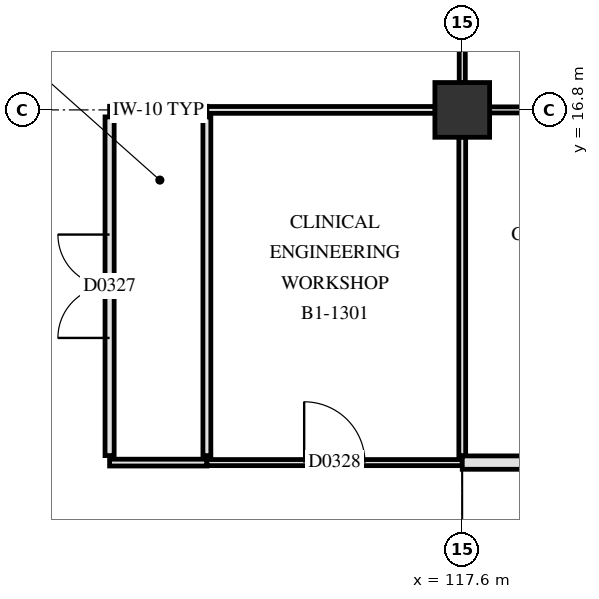
"""IFC4 building model, lengths in metres.
Left out: names, types, materials, properties, quantities, classifications, styles, units other than length and angle.
Written with IfcOpenShell. Run it as: python <this file> out.ifc"""

import sys

from ifc_helpers import new_model, si_unit, direction, frame, frame_2d, origin, origin_2d, place, context, subcontext, project, spatial, rectangle, extrude, element, fill, save


model = new_model("IFC4")
c1 = context("Model", 3, precision=1e-05, world=origin(), true_north=direction((0.0, 1.0)))
c2 = subcontext(c1, "Body", "Model", "MODEL_VIEW")
j1 = project(units=[si_unit("LENGTHUNIT", "METRE"), si_unit("PLANEANGLEUNIT", "RADIAN")], contexts=[c1])
p1 = place(None, origin())
s1 = spatial("IfcSite", under=j1, at=p1, CompositionType="ELEMENT")
p2 = place(p1, origin())
s2 = spatial("IfcBuilding", under=s1, at=p2, CompositionType="ELEMENT")
p3 = place(p2, frame((0.0, 0.0, -5.4)))
s3 = spatial("IfcBuildingStorey", under=s2, at=p3, CompositionType="ELEMENT", Elevation=-5.4)
p4 = place(p3, frame((117.6, 16.8, 0.0), z_axis=(0.0, 0.0, 1.0), x_axis=(1.0, 0.0, 0.0)))
e1 = element("IfcColumn", 1, at=p4, inside=s3, PredefinedType="COLUMN", context=c2, shape_type="SweptSolid", body=[
    extrude(rectangle(XDim=0.9, YDim=0.9, at=origin_2d()), origin(), (0.0, 0.0, 1.0), 5.4),
])
p5 = place(p3, frame((111.8, 11.0, 0.0), z_axis=(0.0, 0.0, 1.0), x_axis=(1.0, 0.0, 0.0)))
e2 = element("IfcWall", 2, at=p5, inside=s3, PredefinedType="PARTITIONING", context=c2, shape_type="SweptSolid", body=[
    extrude(rectangle(XDim=1.6, YDim=0.112, at=frame_2d((0.8, 0.0))), origin(), (0.0, 0.0, 1.0), 5.07),
])
p6 = place(p3, frame((113.4, 11.0, 0.0), z_axis=(0.0, 0.0, 1.0), x_axis=(1.0, 0.0, 0.0)))
e3 = element("IfcWall", 3, at=p6, inside=s3, PredefinedType="PARTITIONING", context=c2, shape_type="SweptSolid", body=[
    extrude(rectangle(XDim=4.2, YDim=0.1, at=frame_2d((2.1, 0.0))), origin(), (0.0, 0.0, 1.0), 4.47),
])
p7 = place(p6, frame((1.6, 0.0, 0.0)))
e4 = element("IfcOpeningElement", 4, at=p7, cuts=e3, PredefinedType="OPENING", context=c2, shape_type="SweptSolid", body=[
    extrude(rectangle(XDim=1.0, YDim=2.15, at=frame_2d((0.5, 1.075))), frame((0.0, 0.06, 0.0), z_axis=(0.0, -1.0, 0.0), x_axis=(1.0, 0.0, 0.0)), (0.0, 0.0, 1.0), 0.12),
])
p8 = place(p3, frame((117.6, 11.0, 0.0), z_axis=(0.0, 0.0, 1.0), x_axis=(1.0, 0.0, 0.0)))
e5 = element("IfcWall", 5, at=p8, inside=s3, PredefinedType="PARTITIONING", context=c2, shape_type="SweptSolid", body=[
    extrude(rectangle(XDim=4.2, YDim=0.22, at=frame_2d((2.1, 0.0))), origin(), (0.0, 0.0, 1.0), 4.47),
])
p9 = place(p8, frame((1.55, 0.0, 0.0)))
e6 = element("IfcOpeningElement", 6, at=p9, cuts=e5, PredefinedType="OPENING", context=c2, shape_type="SweptSolid", body=[
    extrude(rectangle(XDim=1.1, YDim=2.15, at=frame_2d((0.55, 1.075))), frame((0.0, 0.12, 0.0), z_axis=(0.0, -1.0, 0.0), x_axis=(1.0, 0.0, 0.0)), (0.0, 0.0, 1.0), 0.24),
])
p10 = place(p3, frame((111.8, 16.8, 0.0), z_axis=(0.0, 0.0, 1.0), x_axis=(1.0, 0.0, 0.0)))
e7 = element("IfcWall", 7, at=p10, inside=s3, PredefinedType="PARTITIONING", context=c2, shape_type="SweptSolid", body=[
    extrude(rectangle(XDim=1.6, YDim=0.12, at=frame_2d((0.8, 0.0))), origin(), (0.0, 0.0, 1.0), 4.42),
])
p11 = place(p3, frame((113.4, 16.8, 0.0), z_axis=(0.0, 0.0, 1.0), x_axis=(1.0, 0.0, 0.0)))
e8 = element("IfcWall", 8, at=p11, inside=s3, PredefinedType="PARTITIONING", context=c2, shape_type="SweptSolid", body=[
    extrude(rectangle(XDim=3.755, YDim=0.112, at=frame_2d((1.877, 0.0))), origin(), (0.0, 0.0, 1.0), 4.42),
])
p12 = place(p3, frame((118.045, 16.8, 0.0), z_axis=(0.0, 0.0, 1.0), x_axis=(1.0, 0.0, 0.0)))
e9 = element("IfcWall", 9, at=p12, inside=s3, PredefinedType="PARTITIONING", context=c2, shape_type="SweptSolid", body=[
    extrude(rectangle(XDim=3.755, YDim=0.1, at=frame_2d((1.877, 0.0))), origin(), (0.0, 0.0, 1.0), 4.42),
])
p13 = place(p3, frame((111.8, 11.115, 0.0), z_axis=(0.0, 0.0, 1.0), x_axis=(0.0, 1.0, 0.0)))
e10 = element("IfcWall", 10, at=p13, inside=s3, PredefinedType="PARTITIONING", context=c2, shape_type="SweptSolid", body=[
    extrude(rectangle(XDim=5.57, YDim=0.15, at=frame_2d((2.785, 0.0))), origin(), (0.0, 0.0, 1.0), 4.42),
])
p14 = place(p13, frame((1.935, 0.0, 0.0)))
e11 = element("IfcOpeningElement", 11, at=p14, cuts=e10, PredefinedType="OPENING", context=c2, shape_type="SweptSolid", body=[
    extrude(rectangle(XDim=1.7, YDim=2.25, at=frame_2d((0.85, 1.125))), frame((0.0, 0.085, 0.0), z_axis=(0.0, -1.0, 0.0), x_axis=(1.0, 0.0, 0.0)), (0.0, 0.0, 1.0), 0.17),
])
p15 = place(p3, frame((113.4, 11.115, 0.0), z_axis=(0.0, 0.0, 1.0), x_axis=(0.0, 1.0, 0.0)))
e12 = element("IfcWall", 12, at=p15, inside=s3, PredefinedType="PARTITIONING", context=c2, shape_type="SweptSolid", body=[
    extrude(rectangle(XDim=5.57, YDim=0.13, at=frame_2d((2.785, 0.0))), origin(), (0.0, 0.0, 1.0), 4.42),
])
p16 = place(p3, frame((117.6, 11.115, 0.0), z_axis=(0.0, 0.0, 1.0), x_axis=(0.0, 1.0, 0.0)))
e13 = element("IfcWall", 13, at=p16, inside=s3, PredefinedType="PARTITIONING", context=c2, shape_type="SweptSolid", body=[
    extrude(rectangle(XDim=5.24, YDim=0.112, at=frame_2d((2.62, 0.0))), origin(), (0.0, 0.0, 1.0), 4.47),
])
p17 = place(p3, frame((117.6, 17.245, 0.0), z_axis=(0.0, 0.0, 1.0), x_axis=(0.0, 1.0, 0.0)))
e14 = element("IfcWall", 14, at=p17, inside=s3, PredefinedType="PARTITIONING", context=c2, shape_type="SweptSolid", body=[
    extrude(rectangle(XDim=5.24, YDim=0.1, at=frame_2d((2.62, 0.0))), origin(), (0.0, 0.0, 1.0), 4.47),
])
p18 = place(p14, origin())
e15 = element("IfcDoor", 15, at=p18, inside=s3, OperationType="DOUBLE_SWING_RIGHT", PredefinedType="DOOR", context=c2, shape_type="SweptSolid", body=[
    extrude(rectangle(XDim=1.7, YDim=2.25, at=frame_2d((0.85, 1.125))), frame((0.0, 0.025, 0.0), z_axis=(0.0, -1.0, 0.0), x_axis=(1.0, 0.0, 0.0)), (0.0, 0.0, 1.0), 0.05),
])
fill(e11, e15)
p19 = place(p7, origin())
e16 = element("IfcDoor", 16, at=p19, inside=s3, OperationType="SINGLE_SWING_LEFT", PredefinedType="DOOR", context=c2, shape_type="SweptSolid", body=[
    extrude(rectangle(XDim=1.0, YDim=2.15, at=frame_2d((0.5, 1.075))), frame((0.0, 0.025, 0.0), z_axis=(0.0, -1.0, 0.0), x_axis=(1.0, 0.0, 0.0)), (0.0, 0.0, 1.0), 0.05),
])
fill(e4, e16)
save(model, sys.argv[1])
